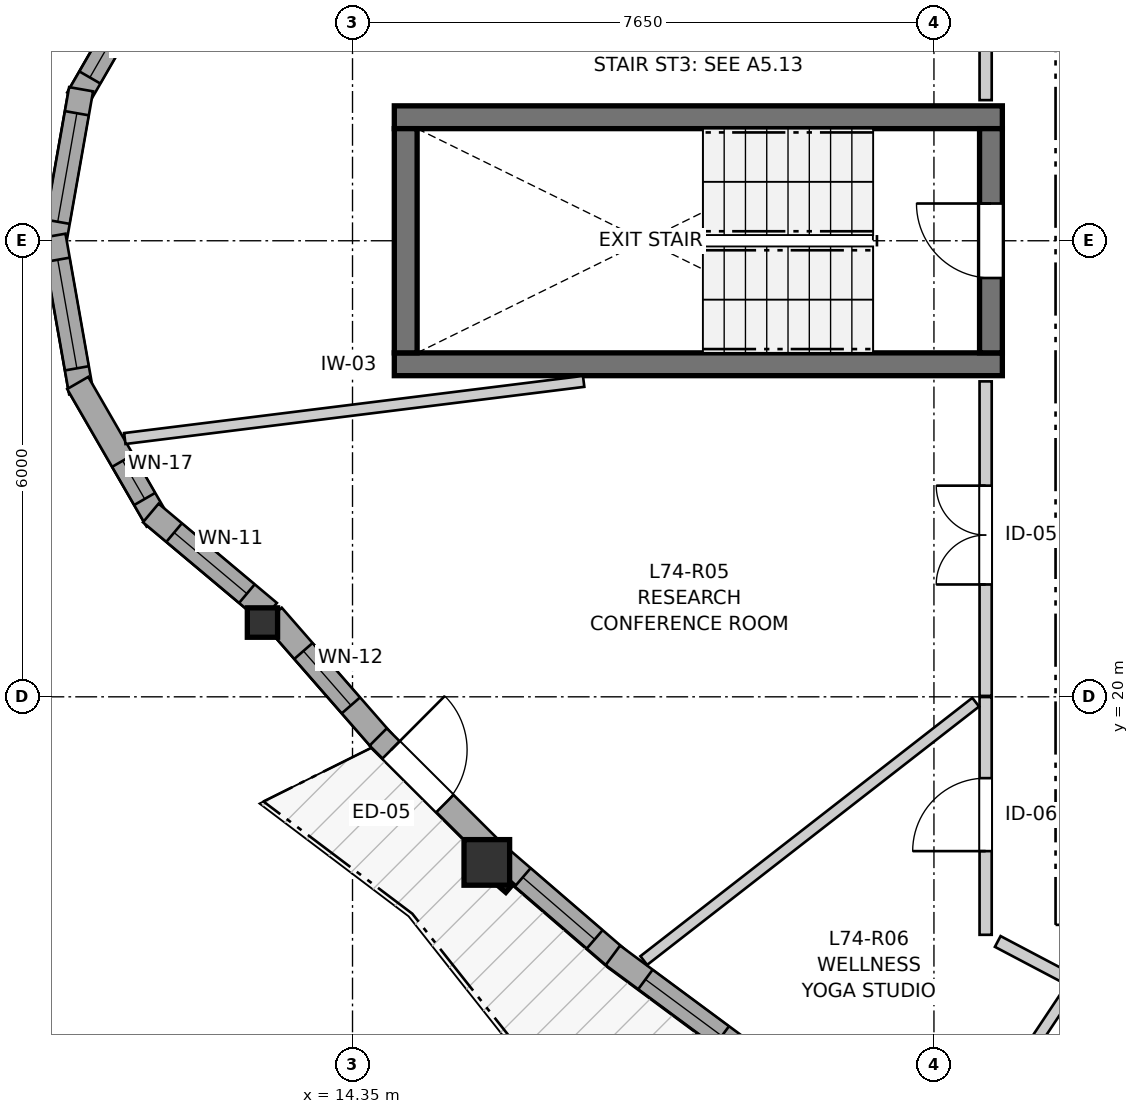
"""IFC4 building model, lengths in metres.
Left out: names, types, materials, properties, quantities, classifications, styles, units other than length and angle.
Written with IfcOpenShell. Run it as: python <this file> out.ifc"""

import sys

from ifc_helpers import new_model, si_unit, direction, frame, frame_2d, origin, origin_2d, place, context, subcontext, project, spatial, rectangle, i_section, extrude, source, transform, mapped, element, fill, save


model = new_model("IFC4")
c1 = context("Model", 3, precision=1e-05, world=origin(), true_north=direction((0.0, 1.0)))
c2 = subcontext(c1, "Body", "Model", "MODEL_VIEW")
j1 = project(units=[si_unit("LENGTHUNIT", "METRE"), si_unit("PLANEANGLEUNIT", "RADIAN")], contexts=[c1])
p1 = place(None, origin())
s1 = spatial("IfcSite", under=j1, at=p1, CompositionType="ELEMENT")
p2 = place(p1, origin())
s2 = spatial("IfcBuilding", under=s1, at=p2, CompositionType="ELEMENT")
p3 = place(p2, frame((0.0, 0.0, 246.8)))
s3 = spatial("IfcBuildingStorey", under=s2, at=p3, CompositionType="ELEMENT", Elevation=246.8)
for number, where, z_axis, x_axis in (
    (1, (14.9, 24.375, 0.0), (0.0, 0.0, 1.0), (1.0, 0.0, 0.0)),
    (2, (22.9, 27.625, 0.0), (0.0, 0.0, 1.0), (-1.0, 0.0, 0.0)),
):
    element("IfcWall", number, at=place(p3, frame(where, z_axis=z_axis, x_axis=x_axis)), inside=s3, PredefinedType="SHEAR", context=c2, shape_type="SweptSolid", body=[
        extrude(rectangle(XDim=8.0, YDim=0.3, at=frame_2d((4.0, 0.0))), origin(), (0.0, 0.0, 1.0), 2.96),
    ])
p4 = place(p3, frame((15.05, 27.475, 0.0), z_axis=(0.0, 0.0, 1.0), x_axis=(0.0, -1.0, 0.0)))
e3 = element("IfcWall", 3, at=p4, inside=s3, PredefinedType="SHEAR", context=c2, shape_type="SweptSolid", body=[
    extrude(rectangle(XDim=2.95, YDim=0.3, at=frame_2d((1.475, 0.0))), origin(), (0.0, 0.0, 1.0), 2.96),
])
p5 = place(p3, frame((22.75, 24.525, 0.0), z_axis=(0.0, 0.0, 1.0), x_axis=(0.0, 1.0, 0.0)))
e4 = element("IfcWall", 4, at=p5, inside=s3, PredefinedType="SHEAR", context=c2, shape_type="SweptSolid", body=[
    extrude(rectangle(XDim=2.95, YDim=0.3, at=frame_2d((1.475, 0.0))), origin(), (0.0, 0.0, 1.0), 2.96),
])
p6 = place(p5, frame((0.985, 0.0, 0.0)))
e5 = element("IfcOpeningElement", 5, at=p6, cuts=e4, PredefinedType="OPENING", context=c2, shape_type="SweptSolid", body=[
    extrude(rectangle(XDim=0.98, YDim=2.15, at=frame_2d((0.49, 1.075))), frame((0.0, 0.16, 0.0), z_axis=(0.0, -1.0, 0.0), x_axis=(1.0, 0.0, 0.0)), (0.0, 0.0, 1.0), 0.32),
])
m1 = source(origin(), c2, "Body", "SweptSolid", [
    extrude(i_section(OverallWidth=0.398, OverallDepth=0.387, WebThickness=0.019, FlangeThickness=0.03, FilletRadius=0.015, at=origin_2d()), origin(), (0.0, 0.0, 1.0), 2.96),
])
p7 = place(p3, frame((13.165, 20.977, 0.0), z_axis=(0.0, 0.0, 1.0), x_axis=(1.0, 0.0, 0.0)))
e6 = element("IfcColumn", 6, at=p7, inside=s3, PredefinedType="PILASTER", context=c2, shape_type="MappedRepresentation", body=[
    mapped(m1, transform((0.0, 0.0, 0.0), x_axis=(1.0, 0.0, 0.0), y_axis=(0.0, 1.0, 0.0), z_axis=(0.0, 0.0, 1.0), scale=1.0)),
])
m2 = source(origin(), c2, "Body", "SweptSolid", [
    extrude(rectangle(XDim=0.6, YDim=0.6, at=origin_2d()), origin(), (0.0, 0.0, 1.0), 2.96),
])
p8 = place(p3, frame((16.117, 17.821, 0.0), z_axis=(0.0, 0.0, 1.0), x_axis=(1.0, 0.0, 0.0)))
e7 = element("IfcColumn", 7, at=p8, inside=s3, PredefinedType="COLUMN", context=c2, shape_type="MappedRepresentation", body=[
    mapped(m2, transform((0.0, 0.0, 0.0), x_axis=(1.0, 0.0, 0.0), y_axis=(0.0, 1.0, 0.0), z_axis=(0.0, 0.0, 1.0), scale=1.0)),
])
p9 = place(p3, frame((11.78, 29.681, 0.0), z_axis=(0.0, 0.0, 1.0), x_axis=(-0.499995423472, -0.866028046028, 0.0)))
e8 = element("IfcWall", 8, at=p9, inside=s3, PredefinedType="SOLIDWALL", context=c2, shape_type="SweptSolid", body=[
    extrude(rectangle(XDim=2.09, YDim=0.32, at=frame_2d((1.045, 0.0))), origin(), (0.0, 0.0, 1.0), 2.58),
])
p10 = place(p9, frame((0.32, 0.0, 0.82)))
e9 = element("IfcOpeningElement", 9, at=p10, cuts=e8, PredefinedType="OPENING", context=c2, shape_type="SweptSolid", body=[
    extrude(rectangle(XDim=1.45, YDim=1.25, at=frame_2d((0.725, 0.625))), frame((0.0, 0.17, 0.0), z_axis=(0.0, -1.0, 0.0), x_axis=(1.0, 0.0, 0.0)), (0.0, 0.0, 1.0), 0.34),
])
p11 = place(p3, frame((10.779, 27.993, 0.0), z_axis=(0.0, 0.0, 1.0), x_axis=(-0.173672066494, -0.984803540469, 0.0)))
e10 = element("IfcWall", 10, at=p11, inside=s3, PredefinedType="SOLIDWALL", context=c2, shape_type="SweptSolid", body=[
    extrude(rectangle(XDim=2.09, YDim=0.32, at=frame_2d((1.045, 0.0))), origin(), (0.0, 0.0, 1.0), 2.58),
])
p12 = place(p11, frame((0.32, 0.0, 0.82)))
e11 = element("IfcOpeningElement", 11, at=p12, cuts=e10, PredefinedType="OPENING", context=c2, shape_type="SweptSolid", body=[
    extrude(rectangle(XDim=1.45, YDim=1.25, at=frame_2d((0.725, 0.625))), frame((0.0, 0.17, 0.0), z_axis=(0.0, -1.0, 0.0), x_axis=(1.0, 0.0, 0.0)), (0.0, 0.0, 1.0), 0.34),
])
p13 = place(p3, frame((10.416, 26.065, 0.0), z_axis=(0.0, 0.0, 1.0), x_axis=(0.173672066494, -0.984803540469, 0.0)))
e12 = element("IfcWall", 12, at=p13, inside=s3, PredefinedType="SOLIDWALL", context=c2, shape_type="SweptSolid", body=[
    extrude(rectangle(XDim=2.09, YDim=0.32, at=frame_2d((1.045, 0.0))), origin(), (0.0, 0.0, 1.0), 2.58),
])
p14 = place(p13, frame((0.32, 0.0, 0.82)))
e13 = element("IfcOpeningElement", 13, at=p14, cuts=e12, PredefinedType="OPENING", context=c2, shape_type="SweptSolid", body=[
    extrude(rectangle(XDim=1.45, YDim=1.25, at=frame_2d((0.725, 0.625))), frame((0.0, 0.17, 0.0), z_axis=(0.0, -1.0, 0.0), x_axis=(1.0, 0.0, 0.0)), (0.0, 0.0, 1.0), 0.34),
])
p15 = place(p3, frame((10.734, 24.129, 0.0), z_axis=(0.0, 0.0, 1.0), x_axis=(0.499995423472, -0.866028046028, 0.0)))
e14 = element("IfcWall", 14, at=p15, inside=s3, PredefinedType="SOLIDWALL", context=c2, shape_type="SweptSolid", body=[
    extrude(rectangle(XDim=2.09, YDim=0.32, at=frame_2d((1.045, 0.0))), origin(), (0.0, 0.0, 1.0), 2.58),
])
p16 = place(p15, frame((1.182, 0.0, 0.82)))
e15 = element("IfcOpeningElement", 15, at=p16, cuts=e14, PredefinedType="OPENING", context=c2, shape_type="SweptSolid", body=[
    extrude(rectangle(XDim=0.58, YDim=1.35, at=frame_2d((0.29, 0.675))), frame((0.0, 0.17, 0.0), z_axis=(0.0, -1.0, 0.0), x_axis=(1.0, 0.0, 0.0)), (0.0, 0.0, 1.0), 0.34),
])
p17 = place(p3, frame((11.696, 22.419, 0.0), z_axis=(0.0, 0.0, 1.0), x_axis=(0.766099948115, -0.642721455608, 0.0)))
e16 = element("IfcWall", 16, at=p17, inside=s3, PredefinedType="SOLIDWALL", context=c2, shape_type="SweptSolid", body=[
    extrude(rectangle(XDim=2.032, YDim=0.32, at=frame_2d((1.016, 0.0))), origin(), (0.0, 0.0, 1.0), 2.58),
])
p18 = place(p17, frame((0.401, 0.0, 0.82)))
e17 = element("IfcOpeningElement", 17, at=p18, cuts=e16, PredefinedType="OPENING", context=c2, shape_type="SweptSolid", body=[
    extrude(rectangle(XDim=1.25, YDim=1.35, at=frame_2d((0.625, 0.675))), frame((0.0, 0.17, 0.0), z_axis=(0.0, -1.0, 0.0), x_axis=(1.0, 0.0, 0.0)), (0.0, 0.0, 1.0), 0.34),
])
p19 = place(p3, frame((13.299, 21.067, 0.0), z_axis=(0.0, 0.0, 1.0), x_axis=(0.657609731914, -0.753358772759, 0.0)))
e18 = element("IfcWall", 18, at=p19, inside=s3, PredefinedType="SOLIDWALL", context=c2, shape_type="SweptSolid", body=[
    extrude(rectangle(XDim=2.203, YDim=0.32, at=frame_2d((1.102, 0.0))), origin(), (0.0, 0.0, 1.0), 2.58),
])
p20 = place(p19, frame((0.616, 0.0, 0.82)))
e19 = element("IfcOpeningElement", 19, at=p20, cuts=e18, PredefinedType="OPENING", context=c2, shape_type="SweptSolid", body=[
    extrude(rectangle(XDim=0.95, YDim=1.35, at=frame_2d((0.475, 0.675))), frame((0.0, 0.17, 0.0), z_axis=(0.0, -1.0, 0.0), x_axis=(1.0, 0.0, 0.0)), (0.0, 0.0, 1.0), 0.34),
])
p21 = place(p3, frame((14.688, 19.471, 0.0), z_axis=(0.0, 0.0, 1.0), x_axis=(0.708392320445, -0.705818900522, 0.0)))
e20 = element("IfcWall", 20, at=p21, inside=s3, PredefinedType="SOLIDWALL", context=c2, shape_type="SweptSolid", body=[
    extrude(rectangle(XDim=2.087, YDim=0.32, at=frame_2d((1.043, 0.0))), origin(), (0.0, 0.0, 1.0), 2.58),
])
p22 = place(p21, frame((0.24, 0.0, 0.0)))
e21 = element("IfcOpeningElement", 21, at=p22, cuts=e20, PredefinedType="OPENING", context=c2, shape_type="SweptSolid", body=[
    extrude(rectangle(XDim=1.0, YDim=2.1, at=frame_2d((0.5, 1.05))), frame((0.0, 0.17, 0.0), z_axis=(0.0, -1.0, 0.0), x_axis=(1.0, 0.0, 0.0)), (0.0, 0.0, 1.0), 0.34),
])
p23 = place(p3, frame((16.29, 17.884, 0.0), z_axis=(0.0, 0.0, 1.0), x_axis=(0.757405903716, -0.652944329186, 0.0)))
e22 = element("IfcWall", 22, at=p23, inside=s3, PredefinedType="SOLIDWALL", context=c2, shape_type="SweptSolid", body=[
    extrude(rectangle(XDim=2.052, YDim=0.32, at=frame_2d((1.026, 0.0))), origin(), (0.0, 0.0, 1.0), 2.58),
])
p24 = place(p23, frame((0.396, 0.0, 0.82)))
e23 = element("IfcOpeningElement", 23, at=p24, cuts=e22, PredefinedType="OPENING", context=c2, shape_type="SweptSolid", body=[
    extrude(rectangle(XDim=1.25, YDim=1.35, at=frame_2d((0.625, 0.675))), frame((0.0, 0.17, 0.0), z_axis=(0.0, -1.0, 0.0), x_axis=(1.0, 0.0, 0.0)), (0.0, 0.0, 1.0), 0.34),
])
p25 = place(p3, frame((17.775, 16.599, 0.0), z_axis=(0.0, 0.0, 1.0), x_axis=(0.803808524664, -0.594888103493, 0.0)))
e24 = element("IfcWall", 24, at=p25, inside=s3, PredefinedType="SOLIDWALL", context=c2, shape_type="SweptSolid", body=[
    extrude(rectangle(XDim=2.099, YDim=0.32, at=frame_2d((1.049, 0.0))), origin(), (0.0, 0.0, 1.0), 2.58),
])
p26 = place(p25, frame((0.533, 0.0, 0.82)))
e25 = element("IfcOpeningElement", 25, at=p26, cuts=e24, PredefinedType="OPENING", context=c2, shape_type="SweptSolid", body=[
    extrude(rectangle(XDim=1.25, YDim=1.35, at=frame_2d((0.625, 0.675))), frame((0.0, 0.17, 0.0), z_axis=(0.0, -1.0, 0.0), x_axis=(1.0, 0.0, 0.0)), (0.0, 0.0, 1.0), 0.34),
])
p27 = place(p3, frame((22.68, 27.85, 0.0), z_axis=(0.0, 0.0, 1.0), x_axis=(0.0, 1.0, 0.0)))
e26 = element("IfcWall", 26, at=p27, inside=s3, PredefinedType="PARTITIONING", context=c2, shape_type="SweptSolid", body=[
    extrude(rectangle(XDim=4.377, YDim=0.16, at=frame_2d((2.188, 0.0))), origin(), (0.0, 0.0, 1.0), 2.96),
])
p28 = place(p27, frame((1.559, 0.0, 0.0)))
e27 = element("IfcOpeningElement", 27, at=p28, cuts=e26, PredefinedType="OPENING", context=c2, shape_type="SweptSolid", body=[
    extrude(rectangle(XDim=1.3, YDim=2.1, at=frame_2d((0.65, 1.05))), frame((0.0, 0.09, 0.0), z_axis=(0.0, -1.0, 0.0), x_axis=(1.0, 0.0, 0.0)), (0.0, 0.0, 1.0), 0.18),
])
p29 = place(p3, frame((22.68, 20.012, 0.0), z_axis=(0.0, 0.0, 1.0), x_axis=(0.0, 1.0, 0.0)))
e28 = element("IfcWall", 28, at=p29, inside=s3, PredefinedType="PARTITIONING", context=c2, shape_type="SweptSolid", body=[
    extrude(rectangle(XDim=4.138, YDim=0.16, at=frame_2d((2.069, 0.0))), origin(), (0.0, 0.0, 1.0), 2.96),
])
p30 = place(p29, frame((1.466, 0.0, 0.0)))
e29 = element("IfcOpeningElement", 29, at=p30, cuts=e28, PredefinedType="OPENING", context=c2, shape_type="SweptSolid", body=[
    extrude(rectangle(XDim=1.3, YDim=2.1, at=frame_2d((0.65, 1.05))), frame((0.0, 0.09, 0.0), z_axis=(0.0, -1.0, 0.0), x_axis=(1.0, 0.0, 0.0)), (0.0, 0.0, 1.0), 0.18),
])
p31 = place(p3, frame((22.68, 16.869, 0.0), z_axis=(0.0, 0.0, 1.0), x_axis=(0.0, 1.0, 0.0)))
e30 = element("IfcWall", 30, at=p31, inside=s3, PredefinedType="PARTITIONING", context=c2, shape_type="SweptSolid", body=[
    extrude(rectangle(XDim=3.128, YDim=0.16, at=frame_2d((1.564, 0.0))), origin(), (0.0, 0.0, 1.0), 2.96),
])
p32 = place(p31, frame((1.101, 0.0, 0.0)))
e31 = element("IfcOpeningElement", 31, at=p32, cuts=e30, PredefinedType="OPENING", context=c2, shape_type="SweptSolid", body=[
    extrude(rectangle(XDim=0.96, YDim=2.1, at=frame_2d((0.48, 1.05))), frame((0.0, 0.09, 0.0), z_axis=(0.0, -1.0, 0.0), x_axis=(1.0, 0.0, 0.0)), (0.0, 0.0, 1.0), 0.18),
])
p33 = place(p3, frame((11.354, 23.398, 0.0), z_axis=(0.0, 0.0, 1.0), x_axis=(0.992337032495, 0.123560567901, 0.0)))
e32 = element("IfcWall", 32, at=p33, inside=s3, PredefinedType="PARTITIONING", context=c2, shape_type="SweptSolid", body=[
    extrude(rectangle(XDim=6.084, YDim=0.145, at=frame_2d((3.042, 0.0))), origin(), (0.0, 0.0, 1.0), 2.96),
])
p34 = place(p3, frame((18.182, 16.531, 0.0), z_axis=(0.0, 0.0, 1.0), x_axis=(0.789162127136, 0.614184937209, 0.0)))
e33 = element("IfcWall", 33, at=p34, inside=s3, PredefinedType="PARTITIONING", context=c2, shape_type="SweptSolid", body=[
    extrude(rectangle(XDim=5.534, YDim=0.145, at=frame_2d((2.767, 0.0))), origin(), (0.0, 0.0, 1.0), 2.96),
])
p35 = place(p3, frame((22.281, 13.882, 0.0), z_axis=(0.0, 0.0, 1.0), x_axis=(0.554204156683, 0.832380773874, 0.0)))
e34 = element("IfcWall", 34, at=p35, inside=s3, PredefinedType="PARTITIONING", context=c2, shape_type="SweptSolid", body=[
    extrude(rectangle(XDim=2.84, YDim=0.145, at=frame_2d((1.42, 0.0))), origin(), (0.0, 0.0, 1.0), 2.96),
])
p36 = place(p3, frame((22.839, 16.781, 0.0), z_axis=(0.0, 0.0, 1.0), x_axis=(0.884533287542, -0.466477076853, 0.0)))
e35 = element("IfcWall", 35, at=p36, inside=s3, PredefinedType="PARTITIONING", context=c2, shape_type="SweptSolid", body=[
    extrude(rectangle(XDim=1.074, YDim=0.16, at=frame_2d((0.537, 0.0))), origin(), (0.0, 0.0, 1.0), 2.96),
])
m3 = source(origin(), c2, "Body", "SweptSolid", [
    extrude(rectangle(XDim=1.45, YDim=1.25, at=frame_2d((0.725, 0.625))), frame((0.0, 0.03, 0.0), z_axis=(0.0, -1.0, 0.0), x_axis=(1.0, 0.0, 0.0)), (0.0, 0.0, 1.0), 0.06),
])
p37 = place(p10, origin())
e36 = element("IfcWindow", 36, at=p37, inside=s3, PartitioningType="SINGLE_PANEL", PredefinedType="WINDOW", context=c2, shape_type="MappedRepresentation", body=[
    mapped(m3, transform((0.0, 0.0, 0.0), x_axis=(1.0, 0.0, 0.0), y_axis=(0.0, 1.0, 0.0), z_axis=(0.0, 0.0, 1.0), scale=1.0)),
])
fill(e9, e36)
p38 = place(p12, origin())
e37 = element("IfcWindow", 37, at=p38, inside=s3, PartitioningType="SINGLE_PANEL", PredefinedType="WINDOW", context=c2, shape_type="MappedRepresentation", body=[
    mapped(m3, transform((0.0, 0.0, 0.0), x_axis=(1.0, 0.0, 0.0), y_axis=(0.0, 1.0, 0.0), z_axis=(0.0, 0.0, 1.0), scale=1.0)),
])
fill(e11, e37)
p39 = place(p14, origin())
e38 = element("IfcWindow", 38, at=p39, inside=s3, PartitioningType="SINGLE_PANEL", PredefinedType="WINDOW", context=c2, shape_type="MappedRepresentation", body=[
    mapped(m3, transform((0.0, 0.0, 0.0), x_axis=(1.0, 0.0, 0.0), y_axis=(0.0, 1.0, 0.0), z_axis=(0.0, 0.0, 1.0), scale=1.0)),
])
fill(e13, e38)
m4 = source(origin(), c2, "Body", "SweptSolid", [
    extrude(rectangle(XDim=0.58, YDim=1.35, at=frame_2d((0.29, 0.675))), frame((0.0, 0.03, 0.0), z_axis=(0.0, -1.0, 0.0), x_axis=(1.0, 0.0, 0.0)), (0.0, 0.0, 1.0), 0.06),
])
p40 = place(p16, origin())
e39 = element("IfcWindow", 39, at=p40, inside=s3, PartitioningType="SINGLE_PANEL", PredefinedType="WINDOW", context=c2, shape_type="MappedRepresentation", body=[
    mapped(m4, transform((0.0, 0.0, 0.0), x_axis=(1.0, 0.0, 0.0), y_axis=(0.0, 1.0, 0.0), z_axis=(0.0, 0.0, 1.0), scale=1.0)),
])
fill(e15, e39)
m5 = source(origin(), c2, "Body", "SweptSolid", [
    extrude(rectangle(XDim=1.25, YDim=1.35, at=frame_2d((0.625, 0.675))), frame((0.0, 0.03, 0.0), z_axis=(0.0, -1.0, 0.0), x_axis=(1.0, 0.0, 0.0)), (0.0, 0.0, 1.0), 0.06),
])
p41 = place(p18, origin())
e40 = element("IfcWindow", 40, at=p41, inside=s3, PartitioningType="SINGLE_PANEL", PredefinedType="WINDOW", context=c2, shape_type="MappedRepresentation", body=[
    mapped(m5, transform((0.0, 0.0, 0.0), x_axis=(1.0, 0.0, 0.0), y_axis=(0.0, 1.0, 0.0), z_axis=(0.0, 0.0, 1.0), scale=1.0)),
])
fill(e17, e40)
m6 = source(origin(), c2, "Body", "SweptSolid", [
    extrude(rectangle(XDim=0.95, YDim=1.35, at=frame_2d((0.475, 0.675))), frame((0.0, 0.03, 0.0), z_axis=(0.0, -1.0, 0.0), x_axis=(1.0, 0.0, 0.0)), (0.0, 0.0, 1.0), 0.06),
])
p42 = place(p20, origin())
e41 = element("IfcWindow", 41, at=p42, inside=s3, PartitioningType="SINGLE_PANEL", PredefinedType="WINDOW", context=c2, shape_type="MappedRepresentation", body=[
    mapped(m6, transform((0.0, 0.0, 0.0), x_axis=(1.0, 0.0, 0.0), y_axis=(0.0, 1.0, 0.0), z_axis=(0.0, 0.0, 1.0), scale=1.0)),
])
fill(e19, e41)
p43 = place(p24, origin())
e42 = element("IfcWindow", 42, at=p43, inside=s3, PartitioningType="SINGLE_PANEL", PredefinedType="WINDOW", context=c2, shape_type="MappedRepresentation", body=[
    mapped(m5, transform((0.0, 0.0, 0.0), x_axis=(1.0, 0.0, 0.0), y_axis=(0.0, 1.0, 0.0), z_axis=(0.0, 0.0, 1.0), scale=1.0)),
])
fill(e23, e42)
p44 = place(p26, origin())
e43 = element("IfcWindow", 43, at=p44, inside=s3, PartitioningType="SINGLE_PANEL", PredefinedType="WINDOW", context=c2, shape_type="MappedRepresentation", body=[
    mapped(m5, transform((0.0, 0.0, 0.0), x_axis=(1.0, 0.0, 0.0), y_axis=(0.0, 1.0, 0.0), z_axis=(0.0, 0.0, 1.0), scale=1.0)),
])
fill(e25, e43)
m7 = source(origin(), c2, "Body", "SweptSolid", [
    extrude(rectangle(XDim=1.0, YDim=2.1, at=frame_2d((0.5, 1.05))), frame((0.0, 0.025, 0.0), z_axis=(0.0, -1.0, 0.0), x_axis=(1.0, 0.0, 0.0)), (0.0, 0.0, 1.0), 0.05),
])
p45 = place(p22, origin())
e44 = element("IfcDoor", 44, at=p45, inside=s3, OperationType="SINGLE_SWING_LEFT", PredefinedType="DOOR", context=c2, shape_type="MappedRepresentation", body=[
    mapped(m7, transform((0.0, 0.0, 0.0), x_axis=(1.0, 0.0, 0.0), y_axis=(0.0, 1.0, 0.0), z_axis=(0.0, 0.0, 1.0), scale=1.0)),
])
fill(e21, e44)
m8 = source(origin(), c2, "Body", "SweptSolid", [
    extrude(rectangle(XDim=0.98, YDim=2.15, at=frame_2d((0.49, 1.075))), frame((0.0, 0.025, 0.0), z_axis=(0.0, -1.0, 0.0), x_axis=(1.0, 0.0, 0.0)), (0.0, 0.0, 1.0), 0.05),
])
p46 = place(p6, origin())
e45 = element("IfcDoor", 45, at=p46, inside=s3, OperationType="SINGLE_SWING_RIGHT", PredefinedType="DOOR", context=c2, shape_type="MappedRepresentation", body=[
    mapped(m8, transform((0.0, 0.0, 0.0), x_axis=(1.0, 0.0, 0.0), y_axis=(0.0, 1.0, 0.0), z_axis=(0.0, 0.0, 1.0), scale=1.0)),
])
fill(e5, e45)
m9 = source(origin(), c2, "Body", "SweptSolid", [
    extrude(rectangle(XDim=1.3, YDim=2.1, at=frame_2d((0.65, 1.05))), frame((0.0, 0.025, 0.0), z_axis=(0.0, -1.0, 0.0), x_axis=(1.0, 0.0, 0.0)), (0.0, 0.0, 1.0), 0.05),
])
p47 = place(p30, origin())
e46 = element("IfcDoor", 46, at=p47, inside=s3, OperationType="DOUBLE_DOOR_SINGLE_SWING", PredefinedType="DOOR", context=c2, shape_type="MappedRepresentation", body=[
    mapped(m9, transform((0.0, 0.0, 0.0), x_axis=(1.0, 0.0, 0.0), y_axis=(0.0, 1.0, 0.0), z_axis=(0.0, 0.0, 1.0), scale=1.0)),
])
fill(e29, e46)
m10 = source(origin(), c2, "Body", "SweptSolid", [
    extrude(rectangle(XDim=0.96, YDim=2.1, at=frame_2d((0.48, 1.05))), frame((0.0, 0.025, 0.0), z_axis=(0.0, -1.0, 0.0), x_axis=(1.0, 0.0, 0.0)), (0.0, 0.0, 1.0), 0.05),
])
p48 = place(p32, origin())
e47 = element("IfcDoor", 47, at=p48, inside=s3, OperationType="SINGLE_SWING_LEFT", PredefinedType="DOOR", context=c2, shape_type="MappedRepresentation", body=[
    mapped(m10, transform((0.0, 0.0, 0.0), x_axis=(1.0, 0.0, 0.0), y_axis=(0.0, 1.0, 0.0), z_axis=(0.0, 0.0, 1.0), scale=1.0)),
])
fill(e31, e47)
save(model, sys.argv[1])
